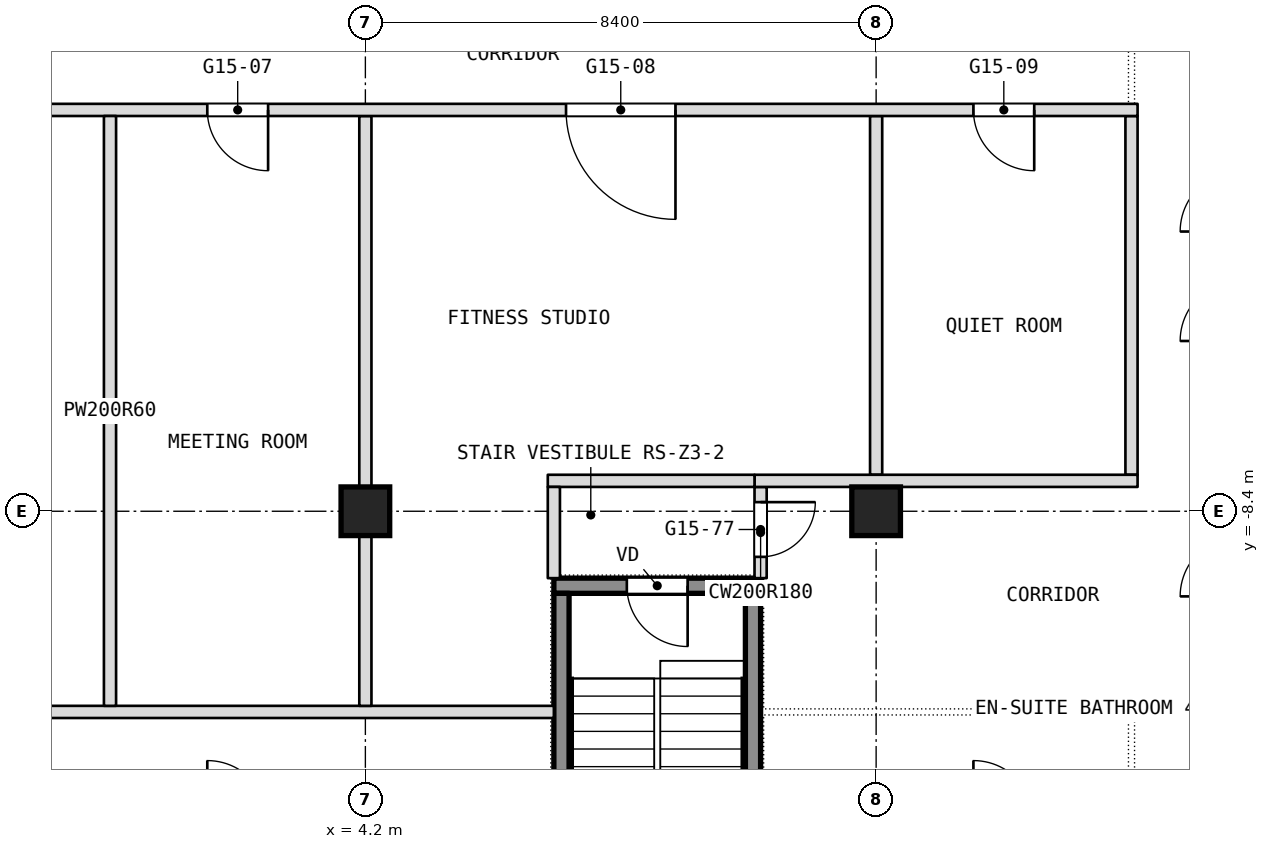
"""IFC4 building model, lengths in metres.
Left out: names, types, materials, properties, quantities, classifications, styles, units other than length and angle.
Written with IfcOpenShell. Run it as: python <this file> out.ifc"""

import sys

from ifc_helpers import new_model, si_unit, direction, frame, frame_2d, origin, origin_2d, place, context, subcontext, project, spatial, rectangle, extrude, element, fill, save


model = new_model("IFC4")
c1 = context("Model", 3, precision=1e-05, world=origin(), true_north=direction((0.0, 1.0)))
c2 = subcontext(c1, "Body", "Model", "MODEL_VIEW")
j1 = project(units=[si_unit("LENGTHUNIT", "METRE"), si_unit("PLANEANGLEUNIT", "RADIAN")], contexts=[c1])
p1 = place(None, origin())
s1 = spatial("IfcSite", under=j1, at=p1, CompositionType="ELEMENT")
p2 = place(p1, origin())
s2 = spatial("IfcBuilding", under=s1, at=p2, CompositionType="ELEMENT")
p3 = place(p2, frame((0.0, 0.0, 194.9)))
s3 = spatial("IfcBuildingStorey", under=s2, at=p3, CompositionType="ELEMENT", Elevation=194.9)
for number, where, z_axis, x_axis in (
    (1, (4.2, -8.4, 0.0), (0.0, 0.0, 1.0), (1.0, 0.0, 0.0)),
    (2, (12.6, -8.4, 0.0), (0.0, 0.0, 1.0), (1.0, 0.0, 0.0)),
):
    element("IfcColumn", number, at=place(p3, frame(where, z_axis=z_axis, x_axis=x_axis)), inside=s3, PredefinedType="COLUMN", context=c2, shape_type="SweptSolid", body=[
        extrude(rectangle(XDim=0.8, YDim=0.8, at=origin_2d()), origin(), (0.0, 0.0, 1.0), 3.6),
    ])
for number, where, z_axis, x_axis in (
    (3, (16.8, -7.8, 0.0), (0.0, 0.0, 1.0), (0.0, 1.0, 0.0)),
    (4, (12.6, -7.8, 0.0), (0.0, 0.0, 1.0), (0.0, 1.0, 0.0)),
):
    element("IfcWall", number, at=place(p3, frame(where, z_axis=z_axis, x_axis=x_axis)), inside=s3, PredefinedType="PARTITIONING", context=c2, shape_type="SweptSolid", body=[
        extrude(rectangle(XDim=5.9, YDim=0.2, at=frame_2d((2.95, 0.0))), origin(), (0.0, 0.0, 1.0), 3.34),
    ])
p4 = place(p3, frame((-7.3, -11.7, 0.0), z_axis=(0.0, 0.0, 1.0), x_axis=(1.0, 0.0, 0.0)))
e5 = element("IfcWall", 5, at=p4, inside=s3, PredefinedType="PARTITIONING", context=c2, shape_type="SweptSolid", body=[
    extrude(rectangle(XDim=14.6, YDim=0.2, at=frame_2d((7.3, 0.0))), origin(), (0.0, 0.0, 1.0), 3.34),
])
p5 = place(p3, frame((10.7, -9.5, 0.0), z_axis=(0.0, 0.0, 1.0), x_axis=(0.0, 1.0, 0.0)))
e6 = element("IfcWall", 6, at=p5, inside=s3, PredefinedType="PARTITIONING", context=c2, shape_type="SweptSolid", body=[
    extrude(rectangle(XDim=1.5, YDim=0.2, at=frame_2d((0.75, 0.0))), origin(), (0.0, 0.0, 1.0), 3.34),
])
p6 = place(p5, frame((0.35, 0.0, 0.0)))
e7 = element("IfcOpeningElement", 7, at=p6, cuts=e6, PredefinedType="OPENING", context=c2, shape_type="SweptSolid", body=[
    extrude(rectangle(XDim=0.9, YDim=2.1, at=frame_2d((0.45, 1.05))), frame((0.0, 0.1, 0.0), z_axis=(0.0, -1.0, 0.0), x_axis=(1.0, 0.0, 0.0)), (0.0, 0.0, 1.0), 0.2),
])
p7 = place(p3, frame((10.6, -7.9, 0.0), z_axis=(0.0, 0.0, 1.0), x_axis=(1.0, 0.0, 0.0)))
e8 = element("IfcWall", 8, at=p7, inside=s3, PredefinedType="PARTITIONING", context=c2, shape_type="SweptSolid", body=[
    extrude(rectangle(XDim=6.3, YDim=0.2, at=frame_2d((3.15, 0.0))), origin(), (0.0, 0.0, 1.0), 3.34),
])
p8 = place(p3, frame((7.2, -7.9, 0.0), z_axis=(0.0, 0.0, 1.0), x_axis=(1.0, 0.0, 0.0)))
e9 = element("IfcWall", 9, at=p8, inside=s3, PredefinedType="PARTITIONING", context=c2, shape_type="SweptSolid", body=[
    extrude(rectangle(XDim=3.4, YDim=0.2, at=frame_2d((1.7, 0.0))), origin(), (0.0, 0.0, 1.0), 3.34),
])
p9 = place(p3, frame((7.3, -9.5, 0.0), z_axis=(0.0, 0.0, 1.0), x_axis=(0.0, 1.0, 0.0)))
e10 = element("IfcWall", 10, at=p9, inside=s3, PredefinedType="PARTITIONING", context=c2, shape_type="SweptSolid", body=[
    extrude(rectangle(XDim=1.5, YDim=0.2, at=frame_2d((0.75, 0.0))), origin(), (0.0, 0.0, 1.0), 3.34),
])
p10 = place(p3, frame((4.2, -11.6, 0.0), z_axis=(0.0, 0.0, 1.0), x_axis=(0.0, 1.0, 0.0)))
e11 = element("IfcWall", 11, at=p10, inside=s3, PredefinedType="PARTITIONING", context=c2, shape_type="SweptSolid", body=[
    extrude(rectangle(XDim=9.7, YDim=0.2, at=frame_2d((4.85, 0.0))), origin(), (0.0, 0.0, 1.0), 3.34),
])
p11 = place(p3, frame((-16.9, -1.8, 0.0), z_axis=(0.0, 0.0, 1.0), x_axis=(1.0, 0.0, 0.0)))
e12 = element("IfcWall", 12, at=p11, inside=s3, PredefinedType="PARTITIONING", context=c2, shape_type="SweptSolid", body=[
    extrude(rectangle(XDim=33.8, YDim=0.2, at=frame_2d((16.9, 0.0))), origin(), (0.0, 0.0, 1.0), 3.34),
])
p12 = place(p11, frame((1.7, 0.0, 0.0)))
e13 = element("IfcOpeningElement", 13, at=p12, cuts=e12, PredefinedType="OPENING", context=c2, shape_type="SweptSolid", body=[
    extrude(rectangle(XDim=1.0, YDim=2.1, at=frame_2d((0.5, 1.05))), frame((0.0, 0.1, 0.0), z_axis=(0.0, -1.0, 0.0), x_axis=(1.0, 0.0, 0.0)), (0.0, 0.0, 1.0), 0.2),
])
p13 = place(p11, frame((5.9, 0.0, 0.0)))
e14 = element("IfcOpeningElement", 14, at=p13, cuts=e12, PredefinedType="OPENING", context=c2, shape_type="SweptSolid", body=[
    extrude(rectangle(XDim=1.0, YDim=2.1, at=frame_2d((0.5, 1.05))), frame((0.0, 0.1, 0.0), z_axis=(0.0, -1.0, 0.0), x_axis=(1.0, 0.0, 0.0)), (0.0, 0.0, 1.0), 0.2),
])
p14 = place(p11, frame((10.1, 0.0, 0.0)))
e15 = element("IfcOpeningElement", 15, at=p14, cuts=e12, PredefinedType="OPENING", context=c2, shape_type="SweptSolid", body=[
    extrude(rectangle(XDim=1.0, YDim=2.1, at=frame_2d((0.5, 1.05))), frame((0.0, 0.1, 0.0), z_axis=(0.0, -1.0, 0.0), x_axis=(1.0, 0.0, 0.0)), (0.0, 0.0, 1.0), 0.2),
])
p15 = place(p11, frame((14.3, 0.0, 0.0)))
e16 = element("IfcOpeningElement", 16, at=p15, cuts=e12, PredefinedType="OPENING", context=c2, shape_type="SweptSolid", body=[
    extrude(rectangle(XDim=1.0, YDim=2.1, at=frame_2d((0.5, 1.05))), frame((0.0, 0.1, 0.0), z_axis=(0.0, -1.0, 0.0), x_axis=(1.0, 0.0, 0.0)), (0.0, 0.0, 1.0), 0.2),
])
p16 = place(p11, frame((18.5, 0.0, 0.0)))
e17 = element("IfcOpeningElement", 17, at=p16, cuts=e12, PredefinedType="OPENING", context=c2, shape_type="SweptSolid", body=[
    extrude(rectangle(XDim=1.0, YDim=2.1, at=frame_2d((0.5, 1.05))), frame((0.0, 0.1, 0.0), z_axis=(0.0, -1.0, 0.0), x_axis=(1.0, 0.0, 0.0)), (0.0, 0.0, 1.0), 0.2),
])
p17 = place(p11, frame((24.4, 0.0, 0.0)))
e18 = element("IfcOpeningElement", 18, at=p17, cuts=e12, PredefinedType="OPENING", context=c2, shape_type="SweptSolid", body=[
    extrude(rectangle(XDim=1.8, YDim=2.1, at=frame_2d((0.9, 1.05))), frame((0.0, 0.1, 0.0), z_axis=(0.0, -1.0, 0.0), x_axis=(1.0, 0.0, 0.0)), (0.0, 0.0, 1.0), 0.2),
])
p18 = place(p11, frame((31.1, 0.0, 0.0)))
e19 = element("IfcOpeningElement", 19, at=p18, cuts=e12, PredefinedType="OPENING", context=c2, shape_type="SweptSolid", body=[
    extrude(rectangle(XDim=1.0, YDim=2.1, at=frame_2d((0.5, 1.05))), frame((0.0, 0.1, 0.0), z_axis=(0.0, -1.0, 0.0), x_axis=(1.0, 0.0, 0.0)), (0.0, 0.0, 1.0), 0.2),
])
p19 = place(p3, frame((0.0, -11.6, 0.0), z_axis=(0.0, 0.0, 1.0), x_axis=(0.0, 1.0, 0.0)))
e20 = element("IfcWall", 20, at=p19, inside=s3, PredefinedType="PARTITIONING", context=c2, shape_type="SweptSolid", body=[
    extrude(rectangle(XDim=9.7, YDim=0.2, at=frame_2d((4.85, 0.0))), origin(), (0.0, 0.0, 1.0), 3.34),
])
p20 = place(p3, frame((7.3, -9.625, 0.1), z_axis=(0.0, 0.0, 1.0), x_axis=(1.0, 0.0, 0.0)))
e21 = element("IfcWall", 21, at=p20, inside=s3, PredefinedType="SHEAR", context=c2, shape_type="SweptSolid", body=[
    extrude(rectangle(XDim=3.4, YDim=0.25, at=frame_2d((1.7, 0.0))), origin(), (0.0, 0.0, 1.0), 3.6),
])
p21 = place(p20, frame((1.2, 0.0, 0.0)))
e22 = element("IfcOpeningElement", 22, at=p21, cuts=e21, PredefinedType="OPENING", context=c2, shape_type="SweptSolid", body=[
    extrude(rectangle(XDim=1.0, YDim=2.1, at=frame_2d((0.5, 1.05))), frame((0.0, 0.125, 0.0), z_axis=(0.0, -1.0, 0.0), x_axis=(1.0, 0.0, 0.0)), (0.0, 0.0, 1.0), 0.25),
])
for number, where, z_axis, x_axis in (
    (23, (7.425, -15.45, 0.1), (0.0, 0.0, 1.0), (0.0, 1.0, 0.0)),
    (24, (10.575, -15.45, 0.1), (0.0, 0.0, 1.0), (0.0, 1.0, 0.0)),
):
    element("IfcWall", number, at=place(p3, frame(where, z_axis=z_axis, x_axis=x_axis)), inside=s3, PredefinedType="SHEAR", context=c2, shape_type="SweptSolid", body=[
        extrude(rectangle(XDim=5.7, YDim=0.25, at=frame_2d((2.85, 0.0))), origin(), (0.0, 0.0, 1.0), 3.6),
    ])
p22 = place(p6, origin())
e25 = element("IfcDoor", 25, at=p22, inside=s3, OperationType="SINGLE_SWING_RIGHT", PredefinedType="DOOR", context=c2, shape_type="SweptSolid", body=[
    extrude(rectangle(XDim=0.9, YDim=2.1, at=frame_2d((0.45, 1.05))), frame((0.0, 0.025, 0.0), z_axis=(0.0, -1.0, 0.0), x_axis=(1.0, 0.0, 0.0)), (0.0, 0.0, 1.0), 0.05),
])
fill(e7, e25)
p23 = place(p16, origin())
e26 = element("IfcDoor", 26, at=p23, inside=s3, OperationType="SINGLE_SWING_RIGHT", PredefinedType="DOOR", context=c2, shape_type="SweptSolid", body=[
    extrude(rectangle(XDim=1.0, YDim=2.1, at=frame_2d((0.5, 1.05))), frame((0.0, 0.025, 0.0), z_axis=(0.0, -1.0, 0.0), x_axis=(1.0, 0.0, 0.0)), (0.0, 0.0, 1.0), 0.05),
])
fill(e17, e26)
p24 = place(p17, origin())
e27 = element("IfcDoor", 27, at=p24, inside=s3, OperationType="DOUBLE_DOOR_SINGLE_SWING", PredefinedType="DOOR", context=c2, shape_type="SweptSolid", body=[
    extrude(rectangle(XDim=1.8, YDim=2.1, at=frame_2d((0.9, 1.05))), frame((0.0, 0.025, 0.0), z_axis=(0.0, -1.0, 0.0), x_axis=(1.0, 0.0, 0.0)), (0.0, 0.0, 1.0), 0.05),
])
fill(e18, e27)
p25 = place(p18, origin())
e28 = element("IfcDoor", 28, at=p25, inside=s3, OperationType="SINGLE_SWING_RIGHT", PredefinedType="DOOR", context=c2, shape_type="SweptSolid", body=[
    extrude(rectangle(XDim=1.0, YDim=2.1, at=frame_2d((0.5, 1.05))), frame((0.0, 0.025, 0.0), z_axis=(0.0, -1.0, 0.0), x_axis=(1.0, 0.0, 0.0)), (0.0, 0.0, 1.0), 0.05),
])
fill(e19, e28)
p26 = place(p21, origin())
e29 = element("IfcDoor", 29, at=p26, inside=s3, OperationType="SINGLE_SWING_LEFT", PredefinedType="DOOR", context=c2, shape_type="SweptSolid", body=[
    extrude(rectangle(XDim=1.0, YDim=2.1, at=frame_2d((0.5, 1.05))), frame((0.0, 0.025, 0.0), z_axis=(0.0, -1.0, 0.0), x_axis=(1.0, 0.0, 0.0)), (0.0, 0.0, 1.0), 0.05),
])
fill(e22, e29)
save(model, sys.argv[1])
